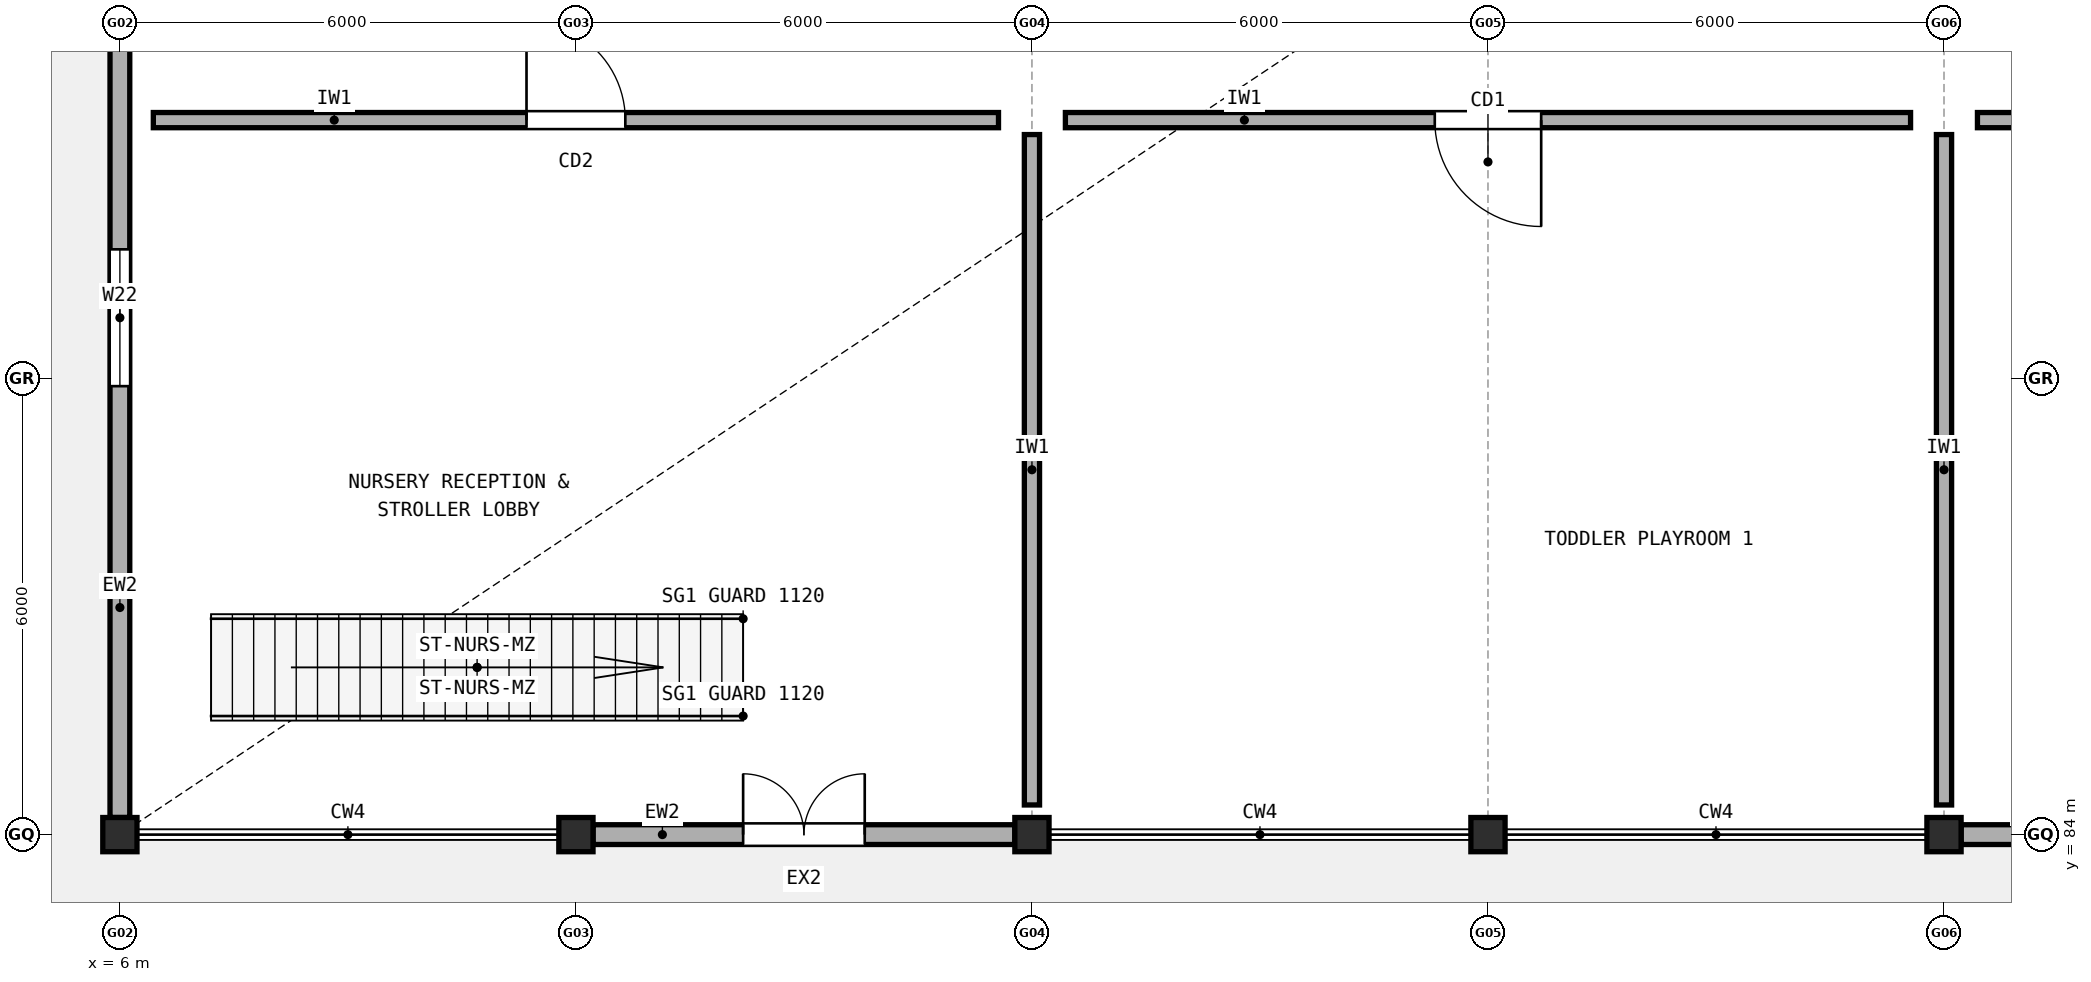
"""IFC4 building model, lengths in metres.
Left out: names, types, materials, properties, quantities, classifications, styles, units other than length and angle.
Written with IfcOpenShell. Run it as: python <this file> out.ifc"""

import sys

from ifc_helpers import new_model, si_unit, direction, frame, frame_2d, origin, origin_2d, place, context, subcontext, project, spatial, rectangle, extrude, element, fill, save


model = new_model("IFC4")
c1 = context("Model", 3, precision=1e-05, world=origin(), true_north=direction((0.0, 1.0)))
c2 = subcontext(c1, "Body", "Model", "MODEL_VIEW")
j1 = project(units=[si_unit("LENGTHUNIT", "METRE"), si_unit("PLANEANGLEUNIT", "RADIAN")], contexts=[c1])
p1 = place(None, origin())
s1 = spatial("IfcSite", under=j1, at=p1, CompositionType="ELEMENT")
p2 = place(p1, origin())
s2 = spatial("IfcBuilding", under=s1, at=p2, CompositionType="ELEMENT")
p3 = place(p2, origin())
s3 = spatial("IfcBuildingStorey", under=s2, at=p3, CompositionType="ELEMENT", Elevation=0.0)
for number, where, z_axis, x_axis in (
    (1, (6.0, 84.0, 0.0), (0.0, 0.0, 1.0), (1.0, 0.0, 0.0)),
    (2, (12.0, 84.0, 0.0), (0.0, 0.0, 1.0), (1.0, 0.0, 0.0)),
    (3, (18.0, 84.0, 0.0), (0.0, 0.0, 1.0), (1.0, 0.0, 0.0)),
    (4, (24.0, 84.0, 0.0), (0.0, 0.0, 1.0), (1.0, 0.0, 0.0)),
    (5, (30.0, 84.0, 0.0), (0.0, 0.0, 1.0), (1.0, 0.0, 0.0)),
):
    element("IfcColumn", number, at=place(p3, frame(where, z_axis=z_axis, x_axis=x_axis)), inside=s3, PredefinedType="COLUMN", context=c2, shape_type="SweptSolid", body=[
        extrude(rectangle(XDim=0.45, YDim=0.45, at=origin_2d()), origin(), (0.0, 0.0, 1.0), 4.23),
    ])
p4 = place(p3, frame((12.225, 84.0, 0.0), z_axis=(0.0, 0.0, 1.0), x_axis=(1.0, 0.0, 0.0)))
e6 = element("IfcWall", 6, at=p4, inside=s3, PredefinedType="STANDARD", context=c2, shape_type="SweptSolid", body=[
    extrude(rectangle(XDim=5.55, YDim=0.26, at=frame_2d((2.775, 0.0))), origin(), (0.0, 0.0, 1.0), 3.562),
])
p5 = place(p4, frame((1.975, 0.0, 0.0)))
e7 = element("IfcOpeningElement", 7, at=p5, cuts=e6, PredefinedType="OPENING", context=c2, shape_type="SweptSolid", body=[
    extrude(rectangle(XDim=1.6, YDim=2.2, at=frame_2d((0.8, 1.1))), frame((0.0, 0.14, 0.0), z_axis=(0.0, -1.0, 0.0), x_axis=(1.0, 0.0, 0.0)), (0.0, 0.0, 1.0), 0.28),
])
p6 = place(p3, frame((30.225, 84.0, 0.0), z_axis=(0.0, 0.0, 1.0), x_axis=(1.0, 0.0, 0.0)))
e8 = element("IfcWall", 8, at=p6, inside=s3, PredefinedType="STANDARD", context=c2, shape_type="SweptSolid", body=[
    extrude(rectangle(XDim=5.55, YDim=0.26, at=frame_2d((2.775, 0.0))), origin(), (0.0, 0.0, 1.0), 3.562),
])
p7 = place(p6, frame((1.975, 0.0, 0.0)))
e9 = element("IfcOpeningElement", 9, at=p7, cuts=e8, PredefinedType="OPENING", context=c2, shape_type="SweptSolid", body=[
    extrude(rectangle(XDim=1.6, YDim=2.2, at=frame_2d((0.8, 1.1))), frame((0.0, 0.14, 0.0), z_axis=(0.0, -1.0, 0.0), x_axis=(1.0, 0.0, 0.0)), (0.0, 0.0, 1.0), 0.28),
])
p8 = place(p3, frame((6.0, 95.9, 0.0), z_axis=(0.0, 0.0, 1.0), x_axis=(0.0, -1.0, 0.0)))
e10 = element("IfcWall", 10, at=p8, inside=s3, PredefinedType="STANDARD", context=c2, shape_type="SweptSolid", body=[
    extrude(rectangle(XDim=11.675, YDim=0.26, at=frame_2d((5.837, 0.0))), origin(), (0.0, 0.0, 1.0), 2.912),
])
p9 = place(p8, frame((4.2, 0.0, 0.85)))
e11 = element("IfcOpeningElement", 11, at=p9, cuts=e10, PredefinedType="OPENING", context=c2, shape_type="SweptSolid", body=[
    extrude(rectangle(XDim=1.8, YDim=1.45, at=frame_2d((0.9, 0.725))), frame((0.0, 0.14, 0.0), z_axis=(0.0, -1.0, 0.0), x_axis=(1.0, 0.0, 0.0)), (0.0, 0.0, 1.0), 0.28),
])
p10 = place(p3, frame((6.44, 93.4, 0.0), z_axis=(0.0, 0.0, 1.0), x_axis=(1.0, 0.0, 0.0)))
e12 = element("IfcWall", 12, at=p10, inside=s3, PredefinedType="SOLIDWALL", context=c2, shape_type="SweptSolid", body=[
    extrude(rectangle(XDim=11.12, YDim=0.2, at=frame_2d((5.56, 0.0))), origin(), (0.0, 0.0, 1.0), 4.23),
])
p11 = place(p10, frame((4.91, 0.0, 0.0)))
e13 = element("IfcOpeningElement", 13, at=p11, cuts=e12, PredefinedType="OPENING", context=c2, shape_type="SweptSolid", body=[
    extrude(rectangle(XDim=1.3, YDim=2.15, at=frame_2d((0.65, 1.075))), frame((0.0, 0.11, 0.0), z_axis=(0.0, -1.0, 0.0), x_axis=(1.0, 0.0, 0.0)), (0.0, 0.0, 1.0), 0.22),
])
p12 = place(p3, frame((18.0, 84.39, 0.0), z_axis=(0.0, 0.0, 1.0), x_axis=(0.0, 1.0, 0.0)))
e14 = element("IfcWall", 14, at=p12, inside=s3, PredefinedType="SOLIDWALL", context=c2, shape_type="SweptSolid", body=[
    extrude(rectangle(XDim=8.82, YDim=0.2, at=frame_2d((4.41, 0.0))), origin(), (0.0, 0.0, 1.0), 2.912),
])
p13 = place(p3, frame((18.44, 93.4, 0.0), z_axis=(0.0, 0.0, 1.0), x_axis=(1.0, 0.0, 0.0)))
e15 = element("IfcWall", 15, at=p13, inside=s3, PredefinedType="SOLIDWALL", context=c2, shape_type="SweptSolid", body=[
    extrude(rectangle(XDim=11.12, YDim=0.2, at=frame_2d((5.56, 0.0))), origin(), (0.0, 0.0, 1.0), 2.912),
])
p14 = place(p13, frame((4.86, 0.0, 0.0)))
e16 = element("IfcOpeningElement", 16, at=p14, cuts=e15, PredefinedType="OPENING", context=c2, shape_type="SweptSolid", body=[
    extrude(rectangle(XDim=1.4, YDim=2.15, at=frame_2d((0.7, 1.075))), frame((0.0, 0.11, 0.0), z_axis=(0.0, -1.0, 0.0), x_axis=(1.0, 0.0, 0.0)), (0.0, 0.0, 1.0), 0.22),
])
p15 = place(p3, frame((30.0, 84.39, 0.0), z_axis=(0.0, 0.0, 1.0), x_axis=(0.0, 1.0, 0.0)))
e17 = element("IfcWall", 17, at=p15, inside=s3, PredefinedType="SOLIDWALL", context=c2, shape_type="SweptSolid", body=[
    extrude(rectangle(XDim=8.82, YDim=0.2, at=frame_2d((4.41, 0.0))), origin(), (0.0, 0.0, 1.0), 2.912),
])
p16 = place(p3, frame((30.44, 93.4, 0.0), z_axis=(0.0, 0.0, 1.0), x_axis=(1.0, 0.0, 0.0)))
e18 = element("IfcWall", 18, at=p16, inside=s3, PredefinedType="SOLIDWALL", context=c2, shape_type="SweptSolid", body=[
    extrude(rectangle(XDim=11.12, YDim=0.2, at=frame_2d((5.56, 0.0))), origin(), (0.0, 0.0, 1.0), 2.912),
])
p17 = place(p16, frame((4.91, 0.0, 0.0)))
e19 = element("IfcOpeningElement", 19, at=p17, cuts=e18, PredefinedType="OPENING", context=c2, shape_type="SweptSolid", body=[
    extrude(rectangle(XDim=1.3, YDim=2.15, at=frame_2d((0.65, 1.075))), frame((0.0, 0.11, 0.0), z_axis=(0.0, -1.0, 0.0), x_axis=(1.0, 0.0, 0.0)), (0.0, 0.0, 1.0), 0.22),
])
p18 = place(p5, frame((1.6, 0.0, 0.0), z_axis=(0.0, 0.0, 1.0), x_axis=(-1.0, 0.0, 0.0)))
e20 = element("IfcDoor", 20, at=p18, inside=s3, OperationType="DOUBLE_DOOR_SINGLE_SWING", PredefinedType="DOOR", context=c2, shape_type="SweptSolid", body=[
    extrude(rectangle(XDim=1.6, YDim=2.2, at=frame_2d((0.8, 1.1))), frame((0.0, 0.025, 0.0), z_axis=(0.0, -1.0, 0.0), x_axis=(1.0, 0.0, 0.0)), (0.0, 0.0, 1.0), 0.05),
])
fill(e7, e20)
p19 = place(p9, origin())
e21 = element("IfcWindow", 21, at=p19, inside=s3, PartitioningType="SINGLE_PANEL", PredefinedType="WINDOW", context=c2, shape_type="SweptSolid", body=[
    extrude(rectangle(XDim=1.8, YDim=1.45, at=frame_2d((0.9, 0.725))), frame((0.0, 0.03, 0.0), z_axis=(0.0, -1.0, 0.0), x_axis=(1.0, 0.0, 0.0)), (0.0, 0.0, 1.0), 0.06),
])
fill(e11, e21)
p20 = place(p11, origin())
e22 = element("IfcDoor", 22, at=p20, inside=s3, OperationType="SINGLE_SWING_LEFT", PredefinedType="DOOR", context=c2, shape_type="SweptSolid", body=[
    extrude(rectangle(XDim=1.3, YDim=2.15, at=frame_2d((0.65, 1.075))), frame((0.0, 0.025, 0.0), z_axis=(0.0, -1.0, 0.0), x_axis=(1.0, 0.0, 0.0)), (0.0, 0.0, 1.0), 0.05),
])
fill(e13, e22)
p21 = place(p14, origin())
e23 = element("IfcDoor", 23, at=p21, inside=s3, OperationType="SINGLE_SWING_RIGHT", PredefinedType="DOOR", context=c2, shape_type="SweptSolid", body=[
    extrude(rectangle(XDim=1.4, YDim=2.15, at=frame_2d((0.7, 1.075))), frame((0.0, 0.025, 0.0), z_axis=(0.0, -1.0, 0.0), x_axis=(1.0, 0.0, 0.0)), (0.0, 0.0, 1.0), 0.05),
])
fill(e16, e23)
save(model, sys.argv[1])
